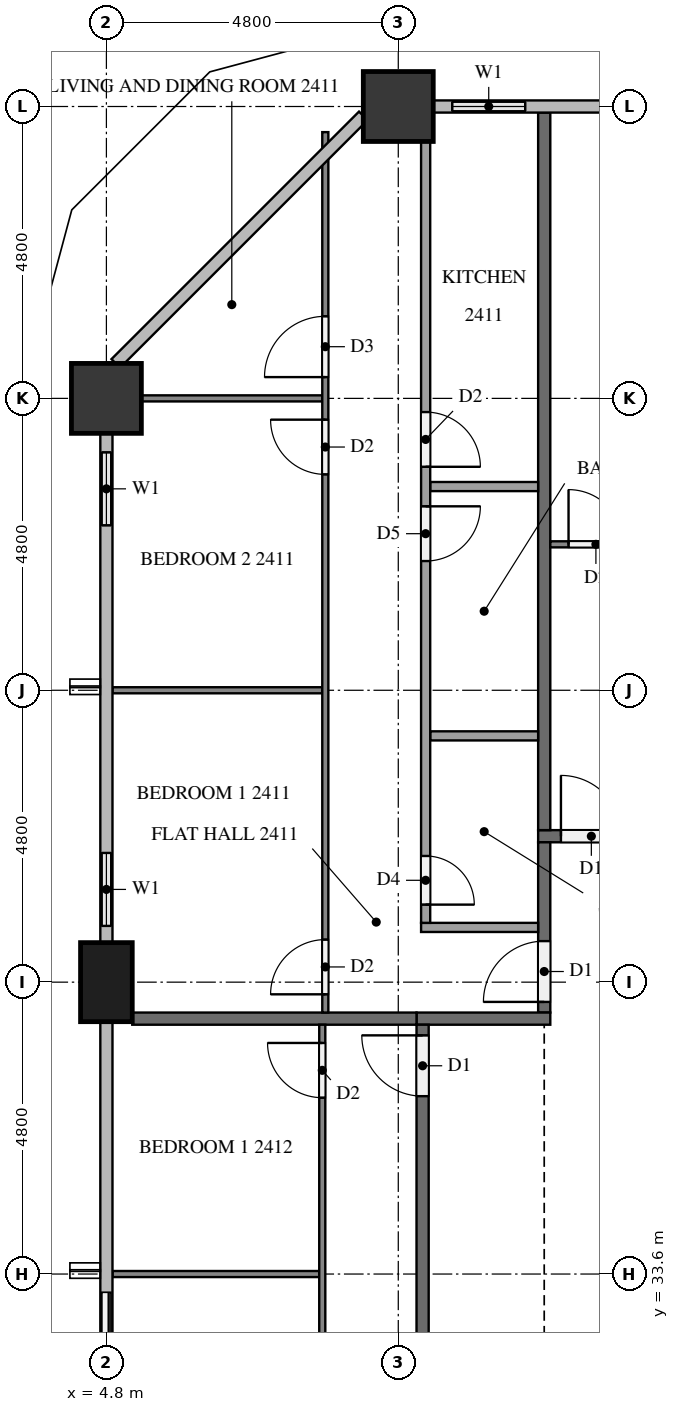
"""IFC4 building model, lengths in metres.
Left out: names, types, materials, properties, quantities, classifications, styles, units other than length and angle.
Written with IfcOpenShell. Run it as: python <this file> out.ifc"""

import sys

from ifc_helpers import new_model, si_unit, direction, frame, frame_2d, origin, origin_2d, place, context, subcontext, project, spatial, rectangle, extrude, element, fill, save


model = new_model("IFC4")
c1 = context("Model", 3, precision=1e-05, world=origin(), true_north=direction((0.0, 1.0)))
c2 = subcontext(c1, "Body", "Model", "MODEL_VIEW")
j1 = project(units=[si_unit("LENGTHUNIT", "METRE"), si_unit("PLANEANGLEUNIT", "RADIAN")], contexts=[c1])
p1 = place(None, origin())
s1 = spatial("IfcSite", under=j1, at=p1, CompositionType="ELEMENT")
p2 = place(p1, origin())
s2 = spatial("IfcBuilding", under=s1, at=p2, CompositionType="ELEMENT")
p3 = place(p2, frame((0.0, 0.0, 96.2)))
s3 = spatial("IfcBuildingStorey", under=s2, at=p3, CompositionType="ELEMENT", Elevation=96.2)
for number, where, z_axis, x_axis in (
    (1, (9.6, 52.8, 0.0), (0.0, 0.0, 1.0), (1.0, 0.0, 0.0)),
    (2, (4.8, 48.0, 0.0), (0.0, 0.0, 1.0), (1.0, 0.0, 0.0)),
):
    element("IfcColumn", number, at=place(p3, frame(where, z_axis=z_axis, x_axis=x_axis)), inside=s3, PredefinedType="COLUMN", context=c2, shape_type="SweptSolid", body=[
        extrude(rectangle(XDim=1.15, YDim=1.15, at=origin_2d()), origin(), (0.0, 0.0, 1.0), 3.2),
    ])
p4 = place(p3, frame((4.8, 38.4, 0.0), z_axis=(0.0, 0.0, 1.0), x_axis=(0.0, 1.0, 0.0)))
e3 = element("IfcColumn", 3, at=p4, inside=s3, PredefinedType="COLUMN", context=c2, shape_type="SweptSolid", body=[
    extrude(rectangle(XDim=1.3, YDim=0.85, at=origin_2d()), origin(), (0.0, 0.0, 1.0), 3.2),
])
p5 = place(p3, frame((12.0, 52.8, 0.0), z_axis=(0.0, 0.0, 1.0), x_axis=(-1.0, 0.0, 0.0)))
e4 = element("IfcWall", 4, at=p5, inside=s3, PredefinedType="SOLIDWALL", context=c2, shape_type="SweptSolid", body=[
    extrude(rectangle(XDim=1.825, YDim=0.15, at=frame_2d((0.913, 0.0))), origin(), (0.0, 0.0, 1.0), 3.2),
])
p6 = place(p5, frame((0.312, 0.0, 0.9)))
e5 = element("IfcOpeningElement", 5, at=p6, cuts=e4, PredefinedType="OPENING", context=c2, shape_type="SweptSolid", body=[
    extrude(rectangle(XDim=1.2, YDim=1.4, at=frame_2d((0.6, 0.7))), frame((0.0, 0.085, 0.0), z_axis=(0.0, -1.0, 0.0), x_axis=(1.0, 0.0, 0.0)), (0.0, 0.0, 1.0), 0.17),
])
p7 = place(p3, frame((4.8, 47.425, 0.0), z_axis=(0.0, 0.0, 1.0), x_axis=(0.0, -1.0, 0.0)))
e6 = element("IfcWall", 6, at=p7, inside=s3, PredefinedType="SOLIDWALL", context=c2, shape_type="SweptSolid", body=[
    extrude(rectangle(XDim=1.825, YDim=0.15, at=frame_2d((0.913, 0.0))), origin(), (0.0, 0.0, 1.0), 3.2),
])
p8 = place(p7, frame((0.312, 0.0, 0.9)))
e7 = element("IfcOpeningElement", 7, at=p8, cuts=e6, PredefinedType="OPENING", context=c2, shape_type="SweptSolid", body=[
    extrude(rectangle(XDim=1.2, YDim=1.4, at=frame_2d((0.6, 0.7))), frame((0.0, 0.085, 0.0), z_axis=(0.0, -1.0, 0.0), x_axis=(1.0, 0.0, 0.0)), (0.0, 0.0, 1.0), 0.17),
])
p9 = place(p3, frame((4.8, 40.8, 0.0), z_axis=(0.0, 0.0, 1.0), x_axis=(0.0, -1.0, 0.0)))
e8 = element("IfcWall", 8, at=p9, inside=s3, PredefinedType="SOLIDWALL", context=c2, shape_type="SweptSolid", body=[
    extrude(rectangle(XDim=1.75, YDim=0.15, at=frame_2d((0.875, 0.0))), origin(), (0.0, 0.0, 1.0), 3.2),
])
p10 = place(p9, frame((0.275, 0.0, 0.9)))
e9 = element("IfcOpeningElement", 9, at=p10, cuts=e8, PredefinedType="OPENING", context=c2, shape_type="SweptSolid", body=[
    extrude(rectangle(XDim=1.2, YDim=1.4, at=frame_2d((0.6, 0.7))), frame((0.0, 0.085, 0.0), z_axis=(0.0, -1.0, 0.0), x_axis=(1.0, 0.0, 0.0)), (0.0, 0.0, 1.0), 0.17),
])
p11 = place(p3, frame((4.8, 33.6, 0.0), z_axis=(0.0, 0.0, 1.0), x_axis=(0.0, -1.0, 0.0)))
e10 = element("IfcWall", 10, at=p11, inside=s3, PredefinedType="SOLIDWALL", context=c2, shape_type="SweptSolid", body=[
    extrude(rectangle(XDim=2.4, YDim=0.15, at=frame_2d((1.2, 0.0))), origin(), (0.0, 0.0, 1.0), 3.2),
])
p12 = place(p11, frame((0.3, 0.0, 0.0)))
e11 = element("IfcOpeningElement", 11, at=p12, cuts=e10, PredefinedType="OPENING", context=c2, shape_type="SweptSolid", body=[
    extrude(rectangle(XDim=1.8, YDim=2.4, at=frame_2d((0.9, 1.2))), frame((0.0, 0.085, 0.0), z_axis=(0.0, -1.0, 0.0), x_axis=(1.0, 0.0, 0.0)), (0.0, 0.0, 1.0), 0.17),
])
p13 = place(p3, frame((11.9, 40.8, 0.0), z_axis=(0.0, 0.0, 1.0), x_axis=(1.0, 0.0, 0.0)))
e12 = element("IfcWall", 12, at=p13, inside=s3, PredefinedType="PARTITIONING", context=c2, shape_type="SweptSolid", body=[
    extrude(rectangle(XDim=38.6, YDim=0.2, at=frame_2d((19.3, 0.0))), origin(), (0.0, 0.0, 1.0), 3.2),
])
p14 = place(p13, frame((31.575, 0.0, 0.0)))
e13 = element("IfcOpeningElement", 13, at=p14, cuts=e12, PredefinedType="OPENING", context=c2, shape_type="SweptSolid", body=[
    extrude(rectangle(XDim=1.0, YDim=2.1, at=frame_2d((0.5, 1.05))), frame((0.0, 0.11, 0.0), z_axis=(0.0, -1.0, 0.0), x_axis=(1.0, 0.0, 0.0)), (0.0, 0.0, 1.0), 0.22),
])
p15 = place(p13, frame((14.775, 0.0, 0.0)))
e14 = element("IfcOpeningElement", 14, at=p15, cuts=e12, PredefinedType="OPENING", context=c2, shape_type="SweptSolid", body=[
    extrude(rectangle(XDim=1.0, YDim=2.1, at=frame_2d((0.5, 1.05))), frame((0.0, 0.11, 0.0), z_axis=(0.0, -1.0, 0.0), x_axis=(1.0, 0.0, 0.0)), (0.0, 0.0, 1.0), 0.22),
])
p16 = place(p13, frame((0.375, 0.0, 0.0)))
e15 = element("IfcOpeningElement", 15, at=p16, cuts=e12, PredefinedType="OPENING", context=c2, shape_type="SweptSolid", body=[
    extrude(rectangle(XDim=1.0, YDim=2.1, at=frame_2d((0.5, 1.05))), frame((0.0, 0.11, 0.0), z_axis=(0.0, -1.0, 0.0), x_axis=(1.0, 0.0, 0.0)), (0.0, 0.0, 1.0), 0.22),
])
p17 = place(p3, frame((12.0, 37.9, 0.0), z_axis=(0.0, 0.0, 1.0), x_axis=(0.0, 1.0, 0.0)))
e16 = element("IfcWall", 16, at=p17, inside=s3, PredefinedType="PARTITIONING", context=c2, shape_type="SweptSolid", body=[
    extrude(rectangle(XDim=2.8, YDim=0.2, at=frame_2d((1.4, 0.0))), origin(), (0.0, 0.0, 1.0), 3.2),
])
p18 = place(p17, frame((0.175, 0.0, 0.0)))
e17 = element("IfcOpeningElement", 17, at=p18, cuts=e16, PredefinedType="OPENING", context=c2, shape_type="SweptSolid", body=[
    extrude(rectangle(XDim=1.0, YDim=2.1, at=frame_2d((0.5, 1.05))), frame((0.0, 0.11, 0.0), z_axis=(0.0, -1.0, 0.0), x_axis=(1.0, 0.0, 0.0)), (0.0, 0.0, 1.0), 0.22),
])
p19 = place(p3, frame((12.1, 37.8, 0.0), z_axis=(0.0, 0.0, 1.0), x_axis=(-1.0, 0.0, 0.0)))
e18 = element("IfcWall", 18, at=p19, inside=s3, PredefinedType="PARTITIONING", context=c2, shape_type="SweptSolid", body=[
    extrude(rectangle(XDim=2.2, YDim=0.2, at=frame_2d((1.1, 0.0))), origin(), (0.0, 0.0, 1.0), 3.2),
])
p20 = place(p3, frame((10.0, 15.1, 0.0), z_axis=(0.0, 0.0, 1.0), x_axis=(0.0, 1.0, 0.0)))
e19 = element("IfcWall", 19, at=p20, inside=s3, PredefinedType="PARTITIONING", context=c2, shape_type="SweptSolid", body=[
    extrude(rectangle(XDim=22.6, YDim=0.2, at=frame_2d((11.3, 0.0))), origin(), (0.0, 0.0, 1.0), 3.2),
])
p21 = place(p20, frame((21.425, 0.0, 0.0)))
e20 = element("IfcOpeningElement", 20, at=p21, cuts=e19, PredefinedType="OPENING", context=c2, shape_type="SweptSolid", body=[
    extrude(rectangle(XDim=1.0, YDim=2.1, at=frame_2d((0.5, 1.05))), frame((0.0, 0.11, 0.0), z_axis=(0.0, -1.0, 0.0), x_axis=(1.0, 0.0, 0.0)), (0.0, 0.0, 1.0), 0.22),
])
p22 = place(p3, frame((12.0, 52.7, 0.0), z_axis=(0.0, 0.0, 1.0), x_axis=(0.0, -1.0, 0.0)))
e21 = element("IfcWall", 21, at=p22, inside=s3, PredefinedType="PARTITIONING", context=c2, shape_type="SweptSolid", body=[
    extrude(rectangle(XDim=11.8, YDim=0.2, at=frame_2d((5.9, 0.0))), origin(), (0.0, 0.0, 1.0), 3.2),
])
p23 = place(p3, frame((5.225, 37.8, 0.0), z_axis=(0.0, 0.0, 1.0), x_axis=(1.0, 0.0, 0.0)))
e22 = element("IfcWall", 22, at=p23, inside=s3, PredefinedType="PARTITIONING", context=c2, shape_type="SweptSolid", body=[
    extrude(rectangle(XDim=4.675, YDim=0.2, at=frame_2d((2.337, 0.0))), origin(), (0.0, 0.0, 1.0), 3.2),
])
p24 = place(p3, frame((12.1, 45.6, 0.0), z_axis=(0.0, 0.0, 1.0), x_axis=(1.0, 0.0, 0.0)))
e23 = element("IfcWall", 23, at=p24, inside=s3, PredefinedType="PARTITIONING", context=c2, shape_type="SweptSolid", body=[
    extrude(rectangle(XDim=14.2, YDim=0.1, at=frame_2d((7.1, 0.0))), origin(), (0.0, 0.0, 1.0), 3.2),
])
p25 = place(p24, frame((0.3, 0.0, 0.0)))
e24 = element("IfcOpeningElement", 24, at=p25, cuts=e23, PredefinedType="OPENING", context=c2, shape_type="SweptSolid", body=[
    extrude(rectangle(XDim=0.9, YDim=2.1, at=frame_2d((0.45, 1.05))), frame((0.0, 0.06, 0.0), z_axis=(0.0, -1.0, 0.0), x_axis=(1.0, 0.0, 0.0)), (0.0, 0.0, 1.0), 0.12),
])
p26 = place(p24, frame((8.15, 0.0, 0.0)))
e25 = element("IfcOpeningElement", 25, at=p26, cuts=e23, PredefinedType="OPENING", context=c2, shape_type="SweptSolid", body=[
    extrude(rectangle(XDim=1.0, YDim=2.1, at=frame_2d((0.5, 1.05))), frame((0.0, 0.06, 0.0), z_axis=(0.0, -1.0, 0.0), x_axis=(1.0, 0.0, 0.0)), (0.0, 0.0, 1.0), 0.12),
])
p27 = place(p24, frame((9.85, 0.0, 0.0)))
e26 = element("IfcOpeningElement", 26, at=p27, cuts=e23, PredefinedType="OPENING", context=c2, shape_type="SweptSolid", body=[
    extrude(rectangle(XDim=0.9, YDim=2.1, at=frame_2d((0.45, 1.05))), frame((0.0, 0.06, 0.0), z_axis=(0.0, -1.0, 0.0), x_axis=(1.0, 0.0, 0.0)), (0.0, 0.0, 1.0), 0.12),
])
p28 = place(p3, frame((8.35, 43.2, 0.0), z_axis=(0.0, 0.0, 1.0), x_axis=(-1.0, 0.0, 0.0)))
e27 = element("IfcWall", 27, at=p28, inside=s3, PredefinedType="PARTITIONING", context=c2, shape_type="SweptSolid", body=[
    extrude(rectangle(XDim=3.45, YDim=0.1, at=frame_2d((1.725, 0.0))), origin(), (0.0, 0.0, 1.0), 3.2),
])
p29 = place(p3, frame((8.35, 48.0, 0.0), z_axis=(0.0, 0.0, 1.0), x_axis=(-1.0, 0.0, 0.0)))
e28 = element("IfcWall", 28, at=p29, inside=s3, PredefinedType="PARTITIONING", context=c2, shape_type="SweptSolid", body=[
    extrude(rectangle(XDim=2.975, YDim=0.1, at=frame_2d((1.488, 0.0))), origin(), (0.0, 0.0, 1.0), 3.2),
])
p30 = place(p3, frame((8.4, 37.9, 0.0), z_axis=(0.0, 0.0, 1.0), x_axis=(0.0, 1.0, 0.0)))
e29 = element("IfcWall", 29, at=p30, inside=s3, PredefinedType="PARTITIONING", context=c2, shape_type="SweptSolid", body=[
    extrude(rectangle(XDim=14.479, YDim=0.1, at=frame_2d((7.239, 0.0))), origin(), (0.0, 0.0, 1.0), 3.2),
])
p31 = place(p30, frame((0.3, 0.0, 0.0)))
e30 = element("IfcOpeningElement", 30, at=p31, cuts=e29, PredefinedType="OPENING", context=c2, shape_type="SweptSolid", body=[
    extrude(rectangle(XDim=0.9, YDim=2.1, at=frame_2d((0.45, 1.05))), frame((0.0, 0.06, 0.0), z_axis=(0.0, -1.0, 0.0), x_axis=(1.0, 0.0, 0.0)), (0.0, 0.0, 1.0), 0.12),
])
p32 = place(p30, frame((8.85, 0.0, 0.0)))
e31 = element("IfcOpeningElement", 31, at=p32, cuts=e29, PredefinedType="OPENING", context=c2, shape_type="SweptSolid", body=[
    extrude(rectangle(XDim=0.9, YDim=2.1, at=frame_2d((0.45, 1.05))), frame((0.0, 0.06, 0.0), z_axis=(0.0, -1.0, 0.0), x_axis=(1.0, 0.0, 0.0)), (0.0, 0.0, 1.0), 0.12),
])
p33 = place(p30, frame((10.45, 0.0, 0.0)))
e32 = element("IfcOpeningElement", 32, at=p33, cuts=e29, PredefinedType="OPENING", context=c2, shape_type="SweptSolid", body=[
    extrude(rectangle(XDim=1.0, YDim=2.1, at=frame_2d((0.5, 1.05))), frame((0.0, 0.06, 0.0), z_axis=(0.0, -1.0, 0.0), x_axis=(1.0, 0.0, 0.0)), (0.0, 0.0, 1.0), 0.12),
])
for number, where, z_axis, x_axis in (
    (33, (11.9, 42.45, 0.0), (0.0, 0.0, 1.0), (-1.0, 0.0, 0.0)),
    (34, (11.9, 46.55, 0.0), (0.0, 0.0, 1.0), (-1.0, 0.0, 0.0)),
):
    element("IfcWall", number, at=place(p3, frame(where, z_axis=z_axis, x_axis=x_axis)), inside=s3, PredefinedType="PARTITIONING", context=c2, shape_type="SweptSolid", body=[
        extrude(rectangle(XDim=1.775, YDim=0.15, at=frame_2d((0.887, 0.0))), origin(), (0.0, 0.0, 1.0), 3.2),
    ])
p34 = place(p3, frame((11.9, 39.3, 0.0), z_axis=(0.0, 0.0, 1.0), x_axis=(-1.0, 0.0, 0.0)))
e35 = element("IfcWall", 35, at=p34, inside=s3, PredefinedType="PARTITIONING", context=c2, shape_type="SweptSolid", body=[
    extrude(rectangle(XDim=1.925, YDim=0.15, at=frame_2d((0.962, 0.0))), origin(), (0.0, 0.0, 1.0), 3.2),
])
p35 = place(p3, frame((10.05, 52.225, 0.0), z_axis=(0.0, 0.0, 1.0), x_axis=(0.0, -1.0, 0.0)))
e36 = element("IfcWall", 36, at=p35, inside=s3, PredefinedType="PARTITIONING", context=c2, shape_type="SweptSolid", body=[
    extrude(rectangle(XDim=12.85, YDim=0.15, at=frame_2d((6.425, 0.0))), origin(), (0.0, 0.0, 1.0), 3.2),
])
p36 = place(p35, frame((11.75, 0.0, 0.0)))
e37 = element("IfcOpeningElement", 37, at=p36, cuts=e36, PredefinedType="OPENING", context=c2, shape_type="SweptSolid", body=[
    extrude(rectangle(XDim=0.8, YDim=2.1, at=frame_2d((0.4, 1.05))), frame((0.0, 0.085, 0.0), z_axis=(0.0, -1.0, 0.0), x_axis=(1.0, 0.0, 0.0)), (0.0, 0.0, 1.0), 0.17),
])
p37 = place(p35, frame((6.0, 0.0, 0.0)))
e38 = element("IfcOpeningElement", 38, at=p37, cuts=e36, PredefinedType="OPENING", context=c2, shape_type="SweptSolid", body=[
    extrude(rectangle(XDim=0.9, YDim=2.1, at=frame_2d((0.45, 1.05))), frame((0.0, 0.085, 0.0), z_axis=(0.0, -1.0, 0.0), x_axis=(1.0, 0.0, 0.0)), (0.0, 0.0, 1.0), 0.17),
])
p38 = place(p35, frame((4.45, 0.0, 0.0)))
e39 = element("IfcOpeningElement", 39, at=p38, cuts=e36, PredefinedType="OPENING", context=c2, shape_type="SweptSolid", body=[
    extrude(rectangle(XDim=0.9, YDim=2.1, at=frame_2d((0.45, 1.05))), frame((0.0, 0.085, 0.0), z_axis=(0.0, -1.0, 0.0), x_axis=(1.0, 0.0, 0.0)), (0.0, 0.0, 1.0), 0.17),
])
p39 = place(p3, frame((8.3, 33.6, 0.0), z_axis=(0.0, 0.0, 1.0), x_axis=(-1.0, 0.0, 0.0)))
e40 = element("IfcWall", 40, at=p39, inside=s3, PredefinedType="PARTITIONING", context=c2, shape_type="SweptSolid", body=[
    extrude(rectangle(XDim=3.4, YDim=0.1, at=frame_2d((1.7, 0.0))), origin(), (0.0, 0.0, 1.0), 3.2),
])
p40 = place(p3, frame((8.35, 15.1, 0.0), z_axis=(0.0, 0.0, 1.0), x_axis=(0.0, 1.0, 0.0)))
e41 = element("IfcWall", 41, at=p40, inside=s3, PredefinedType="PARTITIONING", context=c2, shape_type="SweptSolid", body=[
    extrude(rectangle(XDim=22.6, YDim=0.1, at=frame_2d((11.3, 0.0))), origin(), (0.0, 0.0, 1.0), 3.2),
])
p41 = place(p40, frame((21.4, 0.0, 0.0)))
e42 = element("IfcOpeningElement", 42, at=p41, cuts=e41, PredefinedType="OPENING", context=c2, shape_type="SweptSolid", body=[
    extrude(rectangle(XDim=0.9, YDim=2.1, at=frame_2d((0.45, 1.05))), frame((0.0, 0.06, 0.0), z_axis=(0.0, -1.0, 0.0), x_axis=(1.0, 0.0, 0.0)), (0.0, 0.0, 1.0), 0.12),
])
p42 = place(p40, frame((11.65, 0.0, 0.0)))
e43 = element("IfcOpeningElement", 43, at=p42, cuts=e41, PredefinedType="OPENING", context=c2, shape_type="SweptSolid", body=[
    extrude(rectangle(XDim=1.0, YDim=2.1, at=frame_2d((0.5, 1.05))), frame((0.0, 0.06, 0.0), z_axis=(0.0, -1.0, 0.0), x_axis=(1.0, 0.0, 0.0)), (0.0, 0.0, 1.0), 0.12),
])
p43 = place(p40, frame((10.05, 0.0, 0.0)))
e44 = element("IfcOpeningElement", 44, at=p43, cuts=e41, PredefinedType="OPENING", context=c2, shape_type="SweptSolid", body=[
    extrude(rectangle(XDim=0.9, YDim=2.1, at=frame_2d((0.45, 1.05))), frame((0.0, 0.06, 0.0), z_axis=(0.0, -1.0, 0.0), x_axis=(1.0, 0.0, 0.0)), (0.0, 0.0, 1.0), 0.12),
])
p44 = place(p40, frame((4.45, 0.0, 0.0)))
e45 = element("IfcOpeningElement", 45, at=p44, cuts=e41, PredefinedType="OPENING", context=c2, shape_type="SweptSolid", body=[
    extrude(rectangle(XDim=0.9, YDim=2.1, at=frame_2d((0.45, 1.05))), frame((0.0, 0.06, 0.0), z_axis=(0.0, -1.0, 0.0), x_axis=(1.0, 0.0, 0.0)), (0.0, 0.0, 1.0), 0.12),
])
p45 = place(p40, frame((2.85, 0.0, 0.0)))
e46 = element("IfcOpeningElement", 46, at=p45, cuts=e41, PredefinedType="OPENING", context=c2, shape_type="SweptSolid", body=[
    extrude(rectangle(XDim=0.9, YDim=2.1, at=frame_2d((0.45, 1.05))), frame((0.0, 0.06, 0.0), z_axis=(0.0, -1.0, 0.0), x_axis=(1.0, 0.0, 0.0)), (0.0, 0.0, 1.0), 0.12),
])
p46 = place(p40, frame((0.3, 0.0, 0.0)))
e47 = element("IfcOpeningElement", 47, at=p46, cuts=e41, PredefinedType="OPENING", context=c2, shape_type="SweptSolid", body=[
    extrude(rectangle(XDim=0.8, YDim=2.1, at=frame_2d((0.4, 1.05))), frame((0.0, 0.06, 0.0), z_axis=(0.0, -1.0, 0.0), x_axis=(1.0, 0.0, 0.0)), (0.0, 0.0, 1.0), 0.12),
])
p47 = place(p6, origin())
e48 = element("IfcWindow", 48, at=p47, inside=s3, PartitioningType="SINGLE_PANEL", PredefinedType="WINDOW", context=c2, shape_type="SweptSolid", body=[
    extrude(rectangle(XDim=1.2, YDim=1.4, at=frame_2d((0.6, 0.7))), frame((0.0, 0.03, 0.0), z_axis=(0.0, -1.0, 0.0), x_axis=(1.0, 0.0, 0.0)), (0.0, 0.0, 1.0), 0.06),
])
fill(e5, e48)
p48 = place(p8, origin())
e49 = element("IfcWindow", 49, at=p48, inside=s3, PartitioningType="SINGLE_PANEL", PredefinedType="WINDOW", context=c2, shape_type="SweptSolid", body=[
    extrude(rectangle(XDim=1.2, YDim=1.4, at=frame_2d((0.6, 0.7))), frame((0.0, 0.03, 0.0), z_axis=(0.0, -1.0, 0.0), x_axis=(1.0, 0.0, 0.0)), (0.0, 0.0, 1.0), 0.06),
])
fill(e7, e49)
p49 = place(p10, origin())
e50 = element("IfcWindow", 50, at=p49, inside=s3, PartitioningType="SINGLE_PANEL", PredefinedType="WINDOW", context=c2, shape_type="SweptSolid", body=[
    extrude(rectangle(XDim=1.2, YDim=1.4, at=frame_2d((0.6, 0.7))), frame((0.0, 0.03, 0.0), z_axis=(0.0, -1.0, 0.0), x_axis=(1.0, 0.0, 0.0)), (0.0, 0.0, 1.0), 0.06),
])
fill(e9, e50)
p50 = place(p12, origin())
e51 = element("IfcDoor", 51, at=p50, inside=s3, OperationType="SLIDING_TO_LEFT", PredefinedType="DOOR", context=c2, shape_type="SweptSolid", body=[
    extrude(rectangle(XDim=1.8, YDim=2.4, at=frame_2d((0.9, 1.2))), frame((0.0, 0.025, 0.0), z_axis=(0.0, -1.0, 0.0), x_axis=(1.0, 0.0, 0.0)), (0.0, 0.0, 1.0), 0.05),
])
fill(e11, e51)
p51 = place(p16, origin())
e52 = element("IfcDoor", 52, at=p51, inside=s3, OperationType="SINGLE_SWING_LEFT", PredefinedType="DOOR", context=c2, shape_type="SweptSolid", body=[
    extrude(rectangle(XDim=1.0, YDim=2.1, at=frame_2d((0.5, 1.05))), frame((0.0, 0.025, 0.0), z_axis=(0.0, -1.0, 0.0), x_axis=(1.0, 0.0, 0.0)), (0.0, 0.0, 1.0), 0.05),
])
fill(e15, e52)
p52 = place(p18, origin())
e53 = element("IfcDoor", 53, at=p52, inside=s3, OperationType="SINGLE_SWING_LEFT", PredefinedType="DOOR", context=c2, shape_type="SweptSolid", body=[
    extrude(rectangle(XDim=1.0, YDim=2.1, at=frame_2d((0.5, 1.05))), frame((0.0, 0.025, 0.0), z_axis=(0.0, -1.0, 0.0), x_axis=(1.0, 0.0, 0.0)), (0.0, 0.0, 1.0), 0.05),
])
fill(e17, e53)
p53 = place(p21, origin())
e54 = element("IfcDoor", 54, at=p53, inside=s3, OperationType="SINGLE_SWING_RIGHT", PredefinedType="DOOR", context=c2, shape_type="SweptSolid", body=[
    extrude(rectangle(XDim=1.0, YDim=2.1, at=frame_2d((0.5, 1.05))), frame((0.0, 0.025, 0.0), z_axis=(0.0, -1.0, 0.0), x_axis=(1.0, 0.0, 0.0)), (0.0, 0.0, 1.0), 0.05),
])
fill(e20, e54)
p54 = place(p25, origin())
e55 = element("IfcDoor", 55, at=p54, inside=s3, OperationType="SINGLE_SWING_LEFT", PredefinedType="DOOR", context=c2, shape_type="SweptSolid", body=[
    extrude(rectangle(XDim=0.9, YDim=2.1, at=frame_2d((0.45, 1.05))), frame((0.0, 0.025, 0.0), z_axis=(0.0, -1.0, 0.0), x_axis=(1.0, 0.0, 0.0)), (0.0, 0.0, 1.0), 0.05),
])
fill(e24, e55)
p55 = place(p31, origin())
e56 = element("IfcDoor", 56, at=p55, inside=s3, OperationType="SINGLE_SWING_LEFT", PredefinedType="DOOR", context=c2, shape_type="SweptSolid", body=[
    extrude(rectangle(XDim=0.9, YDim=2.1, at=frame_2d((0.45, 1.05))), frame((0.0, 0.025, 0.0), z_axis=(0.0, -1.0, 0.0), x_axis=(1.0, 0.0, 0.0)), (0.0, 0.0, 1.0), 0.05),
])
fill(e30, e56)
p56 = place(p32, origin())
e57 = element("IfcDoor", 57, at=p56, inside=s3, OperationType="SINGLE_SWING_RIGHT", PredefinedType="DOOR", context=c2, shape_type="SweptSolid", body=[
    extrude(rectangle(XDim=0.9, YDim=2.1, at=frame_2d((0.45, 1.05))), frame((0.0, 0.025, 0.0), z_axis=(0.0, -1.0, 0.0), x_axis=(1.0, 0.0, 0.0)), (0.0, 0.0, 1.0), 0.05),
])
fill(e31, e57)
p57 = place(p33, origin())
e58 = element("IfcDoor", 58, at=p57, inside=s3, OperationType="SINGLE_SWING_LEFT", PredefinedType="DOOR", context=c2, shape_type="SweptSolid", body=[
    extrude(rectangle(XDim=1.0, YDim=2.1, at=frame_2d((0.5, 1.05))), frame((0.0, 0.025, 0.0), z_axis=(0.0, -1.0, 0.0), x_axis=(1.0, 0.0, 0.0)), (0.0, 0.0, 1.0), 0.05),
])
fill(e32, e58)
p58 = place(p36, origin())
e59 = element("IfcDoor", 59, at=p58, inside=s3, OperationType="SINGLE_SWING_RIGHT", PredefinedType="DOOR", context=c2, shape_type="SweptSolid", body=[
    extrude(rectangle(XDim=0.8, YDim=2.1, at=frame_2d((0.4, 1.05))), frame((0.0, 0.025, 0.0), z_axis=(0.0, -1.0, 0.0), x_axis=(1.0, 0.0, 0.0)), (0.0, 0.0, 1.0), 0.05),
])
fill(e37, e59)
p59 = place(p37, origin())
e60 = element("IfcDoor", 60, at=p59, inside=s3, OperationType="SINGLE_SWING_LEFT", PredefinedType="DOOR", context=c2, shape_type="SweptSolid", body=[
    extrude(rectangle(XDim=0.9, YDim=2.1, at=frame_2d((0.45, 1.05))), frame((0.0, 0.025, 0.0), z_axis=(0.0, -1.0, 0.0), x_axis=(1.0, 0.0, 0.0)), (0.0, 0.0, 1.0), 0.05),
])
fill(e38, e60)
p60 = place(p38, origin())
e61 = element("IfcDoor", 61, at=p60, inside=s3, OperationType="SINGLE_SWING_RIGHT", PredefinedType="DOOR", context=c2, shape_type="SweptSolid", body=[
    extrude(rectangle(XDim=0.9, YDim=2.1, at=frame_2d((0.45, 1.05))), frame((0.0, 0.025, 0.0), z_axis=(0.0, -1.0, 0.0), x_axis=(1.0, 0.0, 0.0)), (0.0, 0.0, 1.0), 0.05),
])
fill(e39, e61)
p61 = place(p41, origin())
e62 = element("IfcDoor", 62, at=p61, inside=s3, OperationType="SINGLE_SWING_RIGHT", PredefinedType="DOOR", context=c2, shape_type="SweptSolid", body=[
    extrude(rectangle(XDim=0.9, YDim=2.1, at=frame_2d((0.45, 1.05))), frame((0.0, 0.025, 0.0), z_axis=(0.0, -1.0, 0.0), x_axis=(1.0, 0.0, 0.0)), (0.0, 0.0, 1.0), 0.05),
])
fill(e42, e62)
save(model, sys.argv[1])
